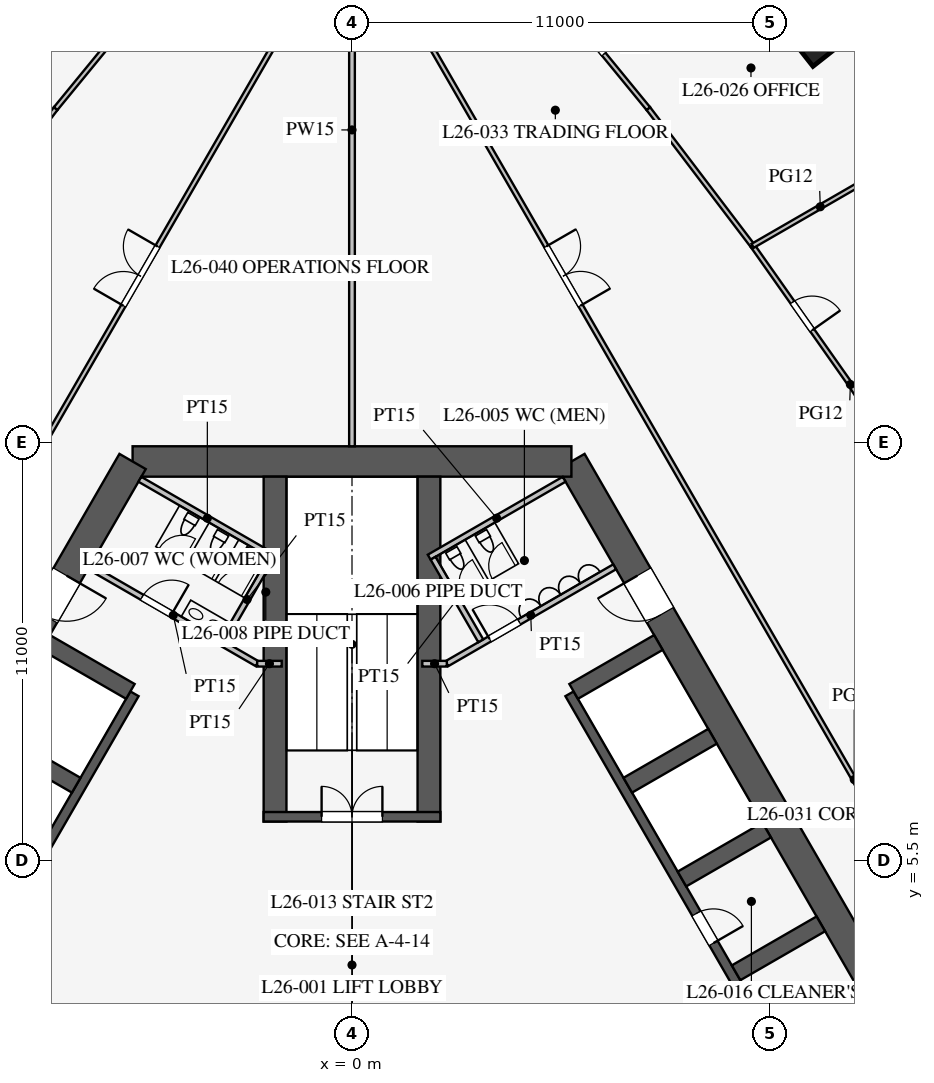
"""IFC4 building model, lengths in metres.
Left out: names, types, materials, properties, quantities, classifications, styles, units other than length and angle.
Written with IfcOpenShell. Run it as: python <this file> out.ifc"""

import sys

from ifc_helpers import new_model, si_unit, direction, frame, frame_2d, origin, origin_2d, place, context, subcontext, project, spatial, rectangle, extrude, element, fill, save


model = new_model("IFC4")
c1 = context("Model", 3, precision=1e-05, world=origin(), true_north=direction((0.0, 1.0)))
c2 = subcontext(c1, "Body", "Model", "MODEL_VIEW")
j1 = project(units=[si_unit("LENGTHUNIT", "METRE"), si_unit("PLANEANGLEUNIT", "RADIAN")], contexts=[c1])
p1 = place(None, origin())
s1 = spatial("IfcSite", under=j1, at=p1, CompositionType="ELEMENT")
p2 = place(p1, origin())
s2 = spatial("IfcBuilding", under=s1, at=p2, CompositionType="ELEMENT")
p3 = place(p2, frame((0.0, 0.0, 115.7)))
s3 = spatial("IfcBuildingStorey", under=s2, at=p3, CompositionType="ELEMENT", Elevation=115.7)
p4 = place(p3, frame((12.077, 27.757, 0.0), z_axis=(0.0, 0.0, 1.0), x_axis=(-0.619648882098, 0.78487913905, 0.0)))
e1 = element("IfcColumn", 1, at=p4, inside=s3, PredefinedType="COLUMN", context=c2, shape_type="SweptSolid", body=[
    extrude(rectangle(XDim=2.2, YDim=1.6, at=origin_2d()), origin(), (0.0, 0.0, 1.0), 4.2),
])
p5 = place(p3, frame((16.743, -3.0, 0.0), z_axis=(0.0, 0.0, 1.0), x_axis=(-0.500002442456, 0.866023993627, 0.0)))
e2 = element("IfcWall", 2, at=p5, inside=s3, PredefinedType="SHEAR", context=c2, shape_type="SweptSolid", body=[
    extrude(rectangle(XDim=21.939, YDim=0.8, at=frame_2d((10.97, 0.0))), origin(), (0.0, 0.0, 1.0), 4.2),
])
p6 = place(p5, frame((17.27, 0.0, 0.0)))
e3 = element("IfcOpeningElement", 3, at=p6, cuts=e2, PredefinedType="OPENING", context=c2, shape_type="SweptSolid", body=[
    extrude(rectangle(XDim=1.2, YDim=2.1, at=frame_2d((0.6, 1.05))), frame((0.0, 0.41, 0.0), z_axis=(0.0, -1.0, 0.0), x_axis=(1.0, 0.0, 0.0)), (0.0, 0.0, 1.0), 0.82),
])
p7 = place(p5, frame((3.47, 0.0, 0.0)))
e4 = element("IfcOpeningElement", 4, at=p7, cuts=e2, PredefinedType="OPENING", context=c2, shape_type="SweptSolid", body=[
    extrude(rectangle(XDim=1.2, YDim=2.1, at=frame_2d((0.6, 1.05))), frame((0.0, 0.41, 0.0), z_axis=(0.0, -1.0, 0.0), x_axis=(1.0, 0.0, 0.0)), (0.0, 0.0, 1.0), 0.82),
])
p8 = place(p3, frame((5.773, 16.0, 0.0), z_axis=(0.0, 0.0, 1.0), x_axis=(-1.0, 0.0, 0.0)))
e5 = element("IfcWall", 5, at=p8, inside=s3, PredefinedType="SHEAR", context=c2, shape_type="SweptSolid", body=[
    extrude(rectangle(XDim=11.547, YDim=0.8, at=frame_2d((5.773, 0.0))), origin(), (0.0, 0.0, 1.0), 4.2),
])
p9 = place(p3, frame((-5.773, 16.0, 0.0), z_axis=(0.0, 0.0, 1.0), x_axis=(-0.500002442456, -0.866023993627, 0.0)))
e6 = element("IfcWall", 6, at=p9, inside=s3, PredefinedType="SHEAR", context=c2, shape_type="SweptSolid", body=[
    extrude(rectangle(XDim=21.939, YDim=0.8, at=frame_2d((10.97, 0.0))), origin(), (0.0, 0.0, 1.0), 4.2),
])
p10 = place(p9, frame((17.27, 0.0, 0.0)))
e7 = element("IfcOpeningElement", 7, at=p10, cuts=e6, PredefinedType="OPENING", context=c2, shape_type="SweptSolid", body=[
    extrude(rectangle(XDim=1.2, YDim=2.1, at=frame_2d((0.6, 1.05))), frame((0.0, 0.41, 0.0), z_axis=(0.0, -1.0, 0.0), x_axis=(1.0, 0.0, 0.0)), (0.0, 0.0, 1.0), 0.82),
])
p11 = place(p9, frame((3.47, 0.0, 0.0)))
e8 = element("IfcOpeningElement", 8, at=p11, cuts=e6, PredefinedType="OPENING", context=c2, shape_type="SweptSolid", body=[
    extrude(rectangle(XDim=1.2, YDim=2.1, at=frame_2d((0.6, 1.05))), frame((0.0, 0.41, 0.0), z_axis=(0.0, -1.0, 0.0), x_axis=(1.0, 0.0, 0.0)), (0.0, 0.0, 1.0), 0.82),
])
p12 = place(p3, frame((11.424, 0.014, 0.0), z_axis=(0.0, 0.0, 1.0), x_axis=(-0.500001763848, 0.866024385424, 0.0)))
e9 = element("IfcWall", 9, at=p12, inside=s3, PredefinedType="SHEAR", context=c2, shape_type="SweptSolid", body=[
    extrude(rectangle(XDim=11.4, YDim=0.25, at=frame_2d((5.7, 0.0))), origin(), (0.0, 0.0, 1.0), 4.2),
])
p13 = place(p12, frame((0.975, 0.0, 0.0)))
e10 = element("IfcOpeningElement", 10, at=p13, cuts=e9, PredefinedType="OPENING", context=c2, shape_type="SweptSolid", body=[
    extrude(rectangle(XDim=0.9, YDim=2.1, at=frame_2d((0.45, 1.05))), frame((0.0, 0.135, 0.0), z_axis=(0.0, -1.0, 0.0), x_axis=(1.0, 0.0, 0.0)), (0.0, 0.0, 1.0), 0.27),
])
p14 = place(p12, frame((3.825, 0.0, 0.0)))
e11 = element("IfcOpeningElement", 11, at=p14, cuts=e9, PredefinedType="OPENING", context=c2, shape_type="SweptSolid", body=[
    extrude(rectangle(XDim=0.9, YDim=2.1, at=frame_2d((0.45, 1.05))), frame((0.0, 0.135, 0.0), z_axis=(0.0, -1.0, 0.0), x_axis=(1.0, 0.0, 0.0)), (0.0, 0.0, 1.0), 0.27),
])
for number, where, z_axis, x_axis in (
    (12, (10.107, 2.544, 0.0), (0.0, 0.0, 1.0), (0.866, 0.5, 0.0)),
    (13, (8.682, 5.012, 0.0), (0.0, 0.0, 1.0), (0.866, 0.5, 0.0)),
    (14, (7.257, 7.481, 0.0), (0.0, 0.0, 1.0), (0.866, 0.5, 0.0)),
):
    element("IfcWall", number, at=place(p3, frame(where, z_axis=z_axis, x_axis=x_axis)), inside=s3, PredefinedType="SHEAR", context=c2, shape_type="SweptSolid", body=[
        extrude(rectangle(XDim=2.575, YDim=0.45, at=frame_2d((1.288, 0.0))), origin(), (0.0, 0.0, 1.0), 4.2),
    ])
p15 = place(p3, frame((5.832, 9.949, 0.0), z_axis=(0.0, 0.0, 1.0), x_axis=(0.866029291668, 0.499993265928, 0.0)))
e15 = element("IfcWall", 15, at=p15, inside=s3, PredefinedType="SHEAR", context=c2, shape_type="SweptSolid", body=[
    extrude(rectangle(XDim=2.575, YDim=0.45, at=frame_2d((1.288, 0.0))), origin(), (0.0, 0.0, 1.0), 4.2),
])
p16 = place(p3, frame((-5.724, 9.886, 0.0), z_axis=(0.0, 0.0, 1.0), x_axis=(-0.500001763848, -0.866024385424, 0.0)))
e16 = element("IfcWall", 16, at=p16, inside=s3, PredefinedType="SHEAR", context=c2, shape_type="SweptSolid", body=[
    extrude(rectangle(XDim=11.4, YDim=0.25, at=frame_2d((5.7, 0.0))), origin(), (0.0, 0.0, 1.0), 4.2),
])
p17 = place(p16, frame((6.525, 0.0, 0.0)))
e17 = element("IfcOpeningElement", 17, at=p17, cuts=e16, PredefinedType="OPENING", context=c2, shape_type="SweptSolid", body=[
    extrude(rectangle(XDim=1.2, YDim=2.2, at=frame_2d((0.6, 1.1))), frame((0.0, 0.135, 0.0), z_axis=(0.0, -1.0, 0.0), x_axis=(1.0, 0.0, 0.0)), (0.0, 0.0, 1.0), 0.27),
])
p18 = place(p16, frame((9.375, 0.0, 0.0)))
e18 = element("IfcOpeningElement", 18, at=p18, cuts=e16, PredefinedType="OPENING", context=c2, shape_type="SweptSolid", body=[
    extrude(rectangle(XDim=1.2, YDim=2.2, at=frame_2d((0.6, 1.1))), frame((0.0, 0.135, 0.0), z_axis=(0.0, -1.0, 0.0), x_axis=(1.0, 0.0, 0.0)), (0.0, 0.0, 1.0), 0.27),
])
p19 = place(p3, frame((-5.832, 9.949, 0.0), z_axis=(0.0, 0.0, 1.0), x_axis=(-0.866029291668, 0.499993265928, 0.0)))
e19 = element("IfcWall", 19, at=p19, inside=s3, PredefinedType="SHEAR", context=c2, shape_type="SweptSolid", body=[
    extrude(rectangle(XDim=2.575, YDim=0.45, at=frame_2d((1.288, 0.0))), origin(), (0.0, 0.0, 1.0), 4.2),
])
p20 = place(p3, frame((-7.257, 7.481, 0.0), z_axis=(0.0, 0.0, 1.0), x_axis=(-0.866046643894, 0.499963209246, 0.0)))
e20 = element("IfcWall", 20, at=p20, inside=s3, PredefinedType="SHEAR", context=c2, shape_type="SweptSolid", body=[
    extrude(rectangle(XDim=2.575, YDim=0.45, at=frame_2d((1.288, 0.0))), origin(), (0.0, 0.0, 1.0), 4.2),
])
for number, where, z_axis, x_axis in (
    (21, (2.025, 6.525, 0.0), (0.0, 0.0, 1.0), (0.0, 1.0, 0.0)),
    (22, (-2.025, 6.525, 0.0), (0.0, 0.0, 1.0), (0.0, 1.0, 0.0)),
):
    element("IfcWall", number, at=place(p3, frame(where, z_axis=z_axis, x_axis=x_axis)), inside=s3, PredefinedType="SHEAR", context=c2, shape_type="SweptSolid", body=[
        extrude(rectangle(XDim=9.075, YDim=0.6, at=frame_2d((4.538, 0.0))), origin(), (0.0, 0.0, 1.0), 4.2),
    ])
p21 = place(p3, frame((2.325, 6.65, 0.0), z_axis=(0.0, 0.0, 1.0), x_axis=(-1.0, 0.0, 0.0)))
e23 = element("IfcWall", 23, at=p21, inside=s3, PredefinedType="SHEAR", context=c2, shape_type="SweptSolid", body=[
    extrude(rectangle(XDim=4.65, YDim=0.25, at=frame_2d((2.325, 0.0))), origin(), (0.0, 0.0, 1.0), 4.2),
])
p22 = place(p21, frame((1.525, 0.0, 0.0)))
e24 = element("IfcOpeningElement", 24, at=p22, cuts=e23, PredefinedType="OPENING", context=c2, shape_type="SweptSolid", body=[
    extrude(rectangle(XDim=1.6, YDim=2.1, at=frame_2d((0.8, 1.05))), frame((0.0, 0.135, 0.0), z_axis=(0.0, -1.0, 0.0), x_axis=(1.0, 0.0, 0.0)), (0.0, 0.0, 1.0), 0.27),
])
p23 = place(p3, frame((2.495, 10.678, 0.0), z_axis=(0.0, 0.0, 1.0), x_axis=(0.86602216432, 0.500005610874, 0.0)))
e25 = element("IfcWall", 25, at=p23, inside=s3, PredefinedType="PARTITIONING", context=c2, shape_type="SweptSolid", body=[
    extrude(rectangle(XDim=5.1, YDim=0.15, at=frame_2d((2.55, 0.0))), origin(), (0.0, 0.0, 1.0), 4.0),
])
p24 = place(p23, frame((1.3, 0.0, 0.0)))
e26 = element("IfcOpeningElement", 26, at=p24, cuts=e25, PredefinedType="OPENING", context=c2, shape_type="SweptSolid", body=[
    extrude(rectangle(XDim=0.9, YDim=2.1, at=frame_2d((0.45, 1.05))), frame((0.0, 0.085, 0.0), z_axis=(0.0, -1.0, 0.0), x_axis=(1.0, 0.0, 0.0)), (0.0, 0.0, 1.0), 0.17),
])
p25 = place(p3, frame((-2.495, 10.678, 0.0), z_axis=(0.0, 0.0, 1.0), x_axis=(-0.86602216432, 0.500005610874, 0.0)))
e27 = element("IfcWall", 27, at=p25, inside=s3, PredefinedType="PARTITIONING", context=c2, shape_type="SweptSolid", body=[
    extrude(rectangle(XDim=5.1, YDim=0.15, at=frame_2d((2.55, 0.0))), origin(), (0.0, 0.0, 1.0), 4.0),
])
p26 = place(p25, frame((2.6, 0.0, 0.0)))
e28 = element("IfcOpeningElement", 28, at=p26, cuts=e27, PredefinedType="OPENING", context=c2, shape_type="SweptSolid", body=[
    extrude(rectangle(XDim=0.9, YDim=2.1, at=frame_2d((0.45, 1.05))), frame((0.0, 0.085, 0.0), z_axis=(0.0, -1.0, 0.0), x_axis=(1.0, 0.0, 0.0)), (0.0, 0.0, 1.0), 0.17),
])
for number, where, z_axis, x_axis in (
    (29, (2.495, 10.678, 0.0), (0.0, 0.0, 1.0), (-1.0, 0.0, 0.0)),
    (30, (-2.495, 10.678, 0.0), (0.0, 0.0, 1.0), (1.0, 0.0, 0.0)),
):
    element("IfcWall", number, at=place(p3, frame(where, z_axis=z_axis, x_axis=x_axis)), inside=s3, PredefinedType="PARTITIONING", context=c2, shape_type="SweptSolid", body=[
        extrude(rectangle(XDim=0.645, YDim=0.15, at=frame_2d((0.323, 0.0))), origin(), (0.0, 0.0, 1.0), 4.0),
    ])
p27 = place(p3, frame((2.031, 13.482, 0.0), z_axis=(0.0, 0.0, 1.0), x_axis=(0.866050731258, 0.499956128963, 0.0)))
e31 = element("IfcWall", 31, at=p27, inside=s3, PredefinedType="PARTITIONING", context=c2, shape_type="SweptSolid", body=[
    extrude(rectangle(XDim=4.1, YDim=0.15, at=frame_2d((2.05, 0.0))), origin(), (0.0, 0.0, 1.0), 4.0),
])
p28 = place(p3, frame((3.389, 11.281, 0.0), z_axis=(0.0, 0.0, 1.0), x_axis=(-0.499989096993, 0.866031698547, 0.0)))
e32 = element("IfcWall", 32, at=p28, inside=s3, PredefinedType="PARTITIONING", context=c2, shape_type="SweptSolid", body=[
    extrude(rectangle(XDim=2.51, YDim=0.15, at=frame_2d((1.255, 0.0))), origin(), (0.0, 0.0, 1.0), 4.0),
])
p29 = place(p3, frame((-2.031, 13.482, 0.0), z_axis=(0.0, 0.0, 1.0), x_axis=(-0.866050731258, 0.499956128963, 0.0)))
e33 = element("IfcWall", 33, at=p29, inside=s3, PredefinedType="PARTITIONING", context=c2, shape_type="SweptSolid", body=[
    extrude(rectangle(XDim=4.1, YDim=0.15, at=frame_2d((2.05, 0.0))), origin(), (0.0, 0.0, 1.0), 4.0),
])
p30 = place(p3, frame((-3.389, 11.281, 0.0), z_axis=(0.0, 0.0, 1.0), x_axis=(0.499989096993, 0.866031698547, 0.0)))
e34 = element("IfcWall", 34, at=p30, inside=s3, PredefinedType="PARTITIONING", context=c2, shape_type="SweptSolid", body=[
    extrude(rectangle(XDim=2.51, YDim=0.15, at=frame_2d((1.255, 0.0))), origin(), (0.0, 0.0, 1.0), 4.0),
])
p31 = place(p3, frame((0.0, 16.4, 0.0), z_axis=(0.0, 0.0, 1.0), x_axis=(0.0, 1.0, 0.0)))
e35 = element("IfcWall", 35, at=p31, inside=s3, PredefinedType="PARTITIONING", context=c2, shape_type="SweptSolid", body=[
    extrude(rectangle(XDim=16.65, YDim=0.15, at=frame_2d((8.325, 0.0))), origin(), (0.0, 0.0, 1.0), 2.3),
])
p32 = place(p3, frame((26.415, -15.231, 0.0), z_axis=(0.0, 0.0, 1.0), x_axis=(-0.50000091641, 0.866024874695, 0.0)))
e36 = element("IfcWall", 36, at=p32, inside=s3, PredefinedType="PARTITIONING", context=c2, shape_type="SweptSolid", body=[
    extrude(rectangle(XDim=52.796, YDim=0.12, at=frame_2d((26.398, 0.0))), origin(), (0.0, 0.0, 1.0), 2.9),
])
p33 = place(p32, frame((10.2, 0.0, 0.15)))
e37 = element("IfcOpeningElement", 37, at=p33, cuts=e36, PredefinedType="OPENING", context=c2, shape_type="SweptSolid", body=[
    extrude(rectangle(XDim=1.8, YDim=2.1, at=frame_2d((0.9, 1.05))), frame((0.0, 0.07, 0.0), z_axis=(0.0, -1.0, 0.0), x_axis=(1.0, 0.0, 0.0)), (0.0, 0.0, 1.0), 0.14),
])
p34 = place(p32, frame((40.8, 0.0, 0.15)))
e38 = element("IfcOpeningElement", 38, at=p34, cuts=e36, PredefinedType="OPENING", context=c2, shape_type="SweptSolid", body=[
    extrude(rectangle(XDim=1.8, YDim=2.1, at=frame_2d((0.9, 1.05))), frame((0.0, 0.07, 0.0), z_axis=(0.0, -1.0, 0.0), x_axis=(1.0, 0.0, 0.0)), (0.0, 0.0, 1.0), 0.14),
])
p35 = place(p3, frame((10.543, 21.675, 0.0), z_axis=(0.0, 0.0, 1.0), x_axis=(-0.605274299339, 0.796016973789, 0.0)))
e39 = element("IfcWall", 39, at=p35, inside=s3, PredefinedType="PARTITIONING", context=c2, shape_type="SweptSolid", body=[
    extrude(rectangle(XDim=4.536, YDim=0.12, at=frame_2d((2.268, 0.0))), origin(), (0.0, 0.0, 1.0), 2.9),
])
p36 = place(p3, frame((7.797, 25.286, 0.0), z_axis=(0.0, 0.0, 1.0), x_axis=(-0.633843962561, 0.773460943503, 0.0)))
e40 = element("IfcWall", 40, at=p36, inside=s3, PredefinedType="PARTITIONING", context=c2, shape_type="SweptSolid", body=[
    extrude(rectangle(XDim=4.561, YDim=0.12, at=frame_2d((2.28, 0.0))), origin(), (0.0, 0.0, 1.0), 2.9),
])
p37 = place(p36, frame((1.85, 0.0, 0.15)))
e41 = element("IfcOpeningElement", 41, at=p37, cuts=e40, PredefinedType="OPENING", context=c2, shape_type="SweptSolid", body=[
    extrude(rectangle(XDim=0.9, YDim=2.1, at=frame_2d((0.45, 1.05))), frame((0.0, 0.07, 0.0), z_axis=(0.0, -1.0, 0.0), x_axis=(1.0, 0.0, 0.0)), (0.0, 0.0, 1.0), 0.14),
])
p38 = place(p3, frame((15.606, 14.206, 0.0), z_axis=(0.0, 0.0, 1.0), x_axis=(-0.546069464151, 0.837739900161, 0.0)))
e42 = element("IfcWall", 42, at=p38, inside=s3, PredefinedType="PARTITIONING", context=c2, shape_type="SweptSolid", body=[
    extrude(rectangle(XDim=4.507, YDim=0.12, at=frame_2d((2.253, 0.0))), origin(), (0.0, 0.0, 1.0), 2.9),
])
p39 = place(p3, frame((13.145, 17.982, 0.0), z_axis=(0.0, 0.0, 1.0), x_axis=(-0.575987178736, 0.817458726745, 0.0)))
e43 = element("IfcWall", 43, at=p39, inside=s3, PredefinedType="PARTITIONING", context=c2, shape_type="SweptSolid", body=[
    extrude(rectangle(XDim=4.518, YDim=0.12, at=frame_2d((2.259, 0.0))), origin(), (0.0, 0.0, 1.0), 2.9),
])
p40 = place(p39, frame((1.8, 0.0, 0.15)))
e44 = element("IfcOpeningElement", 44, at=p40, cuts=e43, PredefinedType="OPENING", context=c2, shape_type="SweptSolid", body=[
    extrude(rectangle(XDim=0.9, YDim=2.1, at=frame_2d((0.45, 1.05))), frame((0.0, 0.07, 0.0), z_axis=(0.0, -1.0, 0.0), x_axis=(1.0, 0.0, 0.0)), (0.0, 0.0, 1.0), 0.14),
])
p41 = place(p3, frame((10.543, 21.675, 0.0), z_axis=(0.0, 0.0, 1.0), x_axis=(0.866019409031, 0.500010383074, 0.0)))
e45 = element("IfcWall", 45, at=p41, inside=s3, PredefinedType="PARTITIONING", context=c2, shape_type="SweptSolid", body=[
    extrude(rectangle(XDim=4.11, YDim=0.12, at=frame_2d((2.055, 0.0))), origin(), (0.0, 0.0, 1.0), 2.9),
])
p42 = place(p3, frame((-0.016, 30.491, 0.0), z_axis=(0.0, 0.0, 1.0), x_axis=(-0.50000091641, -0.866024874695, 0.0)))
e46 = element("IfcWall", 46, at=p42, inside=s3, PredefinedType="PARTITIONING", context=c2, shape_type="SweptSolid", body=[
    extrude(rectangle(XDim=52.796, YDim=0.12, at=frame_2d((26.398, 0.0))), origin(), (0.0, 0.0, 1.0), 2.9),
])
p43 = place(p42, frame((10.2, 0.0, 0.15)))
e47 = element("IfcOpeningElement", 47, at=p43, cuts=e46, PredefinedType="OPENING", context=c2, shape_type="SweptSolid", body=[
    extrude(rectangle(XDim=1.8, YDim=2.1, at=frame_2d((0.9, 1.05))), frame((0.0, 0.07, 0.0), z_axis=(0.0, -1.0, 0.0), x_axis=(1.0, 0.0, 0.0)), (0.0, 0.0, 1.0), 0.14),
])
p44 = place(p42, frame((40.8, 0.0, 0.15)))
e48 = element("IfcOpeningElement", 48, at=p44, cuts=e46, PredefinedType="OPENING", context=c2, shape_type="SweptSolid", body=[
    extrude(rectangle(XDim=1.8, YDim=2.1, at=frame_2d((0.9, 1.05))), frame((0.0, 0.07, 0.0), z_axis=(0.0, -1.0, 0.0), x_axis=(1.0, 0.0, 0.0)), (0.0, 0.0, 1.0), 0.14),
])
p45 = place(p3, frame((-7.797, 25.286, 0.0), z_axis=(0.0, 0.0, 1.0), x_axis=(-0.605274299339, -0.796016973789, 0.0)))
e49 = element("IfcWall", 49, at=p45, inside=s3, PredefinedType="PARTITIONING", context=c2, shape_type="SweptSolid", body=[
    extrude(rectangle(XDim=4.536, YDim=0.12, at=frame_2d((2.268, 0.0))), origin(), (0.0, 0.0, 1.0), 2.9),
])
p46 = place(p45, frame((1.8, 0.0, 0.15)))
e50 = element("IfcOpeningElement", 50, at=p46, cuts=e49, PredefinedType="OPENING", context=c2, shape_type="SweptSolid", body=[
    extrude(rectangle(XDim=0.9, YDim=2.1, at=frame_2d((0.45, 1.05))), frame((0.0, 0.07, 0.0), z_axis=(0.0, -1.0, 0.0), x_axis=(1.0, 0.0, 0.0)), (0.0, 0.0, 1.0), 0.14),
])
p47 = place(p3, frame((-4.906, 28.813, 0.0), z_axis=(0.0, 0.0, 1.0), x_axis=(-0.633843962561, -0.773460943503, 0.0)))
e51 = element("IfcWall", 51, at=p47, inside=s3, PredefinedType="PARTITIONING", context=c2, shape_type="SweptSolid", body=[
    extrude(rectangle(XDim=4.561, YDim=0.12, at=frame_2d((2.28, 0.0))), origin(), (0.0, 0.0, 1.0), 2.9),
])
p48 = place(p24, origin())
e52 = element("IfcDoor", 52, at=p48, inside=s3, OperationType="SINGLE_SWING_LEFT", PredefinedType="DOOR", context=c2, shape_type="SweptSolid", body=[
    extrude(rectangle(XDim=0.9, YDim=2.1, at=frame_2d((0.45, 1.05))), frame((0.0, 0.025, 0.0), z_axis=(0.0, -1.0, 0.0), x_axis=(1.0, 0.0, 0.0)), (0.0, 0.0, 1.0), 0.05),
])
fill(e26, e52)
p49 = place(p26, frame((0.9, 0.0, 0.0), z_axis=(0.0, 0.0, 1.0), x_axis=(-1.0, 0.0, 0.0)))
e53 = element("IfcDoor", 53, at=p49, inside=s3, OperationType="SINGLE_SWING_RIGHT", PredefinedType="DOOR", context=c2, shape_type="SweptSolid", body=[
    extrude(rectangle(XDim=0.9, YDim=2.1, at=frame_2d((0.45, 1.05))), frame((0.0, 0.025, 0.0), z_axis=(0.0, -1.0, 0.0), x_axis=(1.0, 0.0, 0.0)), (0.0, 0.0, 1.0), 0.05),
])
fill(e28, e53)
p50 = place(p22, frame((1.6, 0.0, 0.0), z_axis=(0.0, 0.0, 1.0), x_axis=(-1.0, 0.0, 0.0)))
e54 = element("IfcDoor", 54, at=p50, inside=s3, OperationType="DOUBLE_DOOR_SINGLE_SWING", PredefinedType="DOOR", context=c2, shape_type="SweptSolid", body=[
    extrude(rectangle(XDim=1.6, YDim=2.1, at=frame_2d((0.8, 1.05))), frame((0.0, 0.025, 0.0), z_axis=(0.0, -1.0, 0.0), x_axis=(1.0, 0.0, 0.0)), (0.0, 0.0, 1.0), 0.05),
])
fill(e24, e54)
p51 = place(p6, origin())
e55 = element("IfcDoor", 55, at=p51, inside=s3, OperationType="SINGLE_SWING_RIGHT", PredefinedType="DOOR", context=c2, shape_type="SweptSolid", body=[
    extrude(rectangle(XDim=1.2, YDim=2.1, at=frame_2d((0.6, 1.05))), frame((0.0, 0.025, 0.0), z_axis=(0.0, -1.0, 0.0), x_axis=(1.0, 0.0, 0.0)), (0.0, 0.0, 1.0), 0.05),
])
fill(e3, e55)
p52 = place(p11, origin())
e56 = element("IfcDoor", 56, at=p52, inside=s3, OperationType="SINGLE_SWING_LEFT", PredefinedType="DOOR", context=c2, shape_type="SweptSolid", body=[
    extrude(rectangle(XDim=1.2, YDim=2.1, at=frame_2d((0.6, 1.05))), frame((0.0, 0.025, 0.0), z_axis=(0.0, -1.0, 0.0), x_axis=(1.0, 0.0, 0.0)), (0.0, 0.0, 1.0), 0.05),
])
fill(e8, e56)
p53 = place(p14, frame((0.9, 0.0, 0.0), z_axis=(0.0, 0.0, 1.0), x_axis=(-1.0, 0.0, 0.0)))
e57 = element("IfcDoor", 57, at=p53, inside=s3, OperationType="SINGLE_SWING_RIGHT", PredefinedType="DOOR", context=c2, shape_type="SweptSolid", body=[
    extrude(rectangle(XDim=0.9, YDim=2.1, at=frame_2d((0.45, 1.05))), frame((0.0, 0.025, 0.0), z_axis=(0.0, -1.0, 0.0), x_axis=(1.0, 0.0, 0.0)), (0.0, 0.0, 1.0), 0.05),
])
fill(e11, e57)
p54 = place(p37, frame((0.9, 0.0, 0.0), z_axis=(0.0, 0.0, 1.0), x_axis=(-1.0, 0.0, 0.0)))
e58 = element("IfcDoor", 58, at=p54, inside=s3, OperationType="SINGLE_SWING_LEFT", PredefinedType="DOOR", context=c2, shape_type="SweptSolid", body=[
    extrude(rectangle(XDim=0.9, YDim=2.1, at=frame_2d((0.45, 1.05))), frame((0.0, 0.025, 0.0), z_axis=(0.0, -1.0, 0.0), x_axis=(1.0, 0.0, 0.0)), (0.0, 0.0, 1.0), 0.05),
])
fill(e41, e58)
p55 = place(p40, frame((0.9, 0.0, 0.0), z_axis=(0.0, 0.0, 1.0), x_axis=(-1.0, 0.0, 0.0)))
e59 = element("IfcDoor", 59, at=p55, inside=s3, OperationType="SINGLE_SWING_RIGHT", PredefinedType="DOOR", context=c2, shape_type="SweptSolid", body=[
    extrude(rectangle(XDim=0.9, YDim=2.1, at=frame_2d((0.45, 1.05))), frame((0.0, 0.025, 0.0), z_axis=(0.0, -1.0, 0.0), x_axis=(1.0, 0.0, 0.0)), (0.0, 0.0, 1.0), 0.05),
])
fill(e44, e59)
p56 = place(p34, frame((1.8, 0.0, 0.0), z_axis=(0.0, 0.0, 1.0), x_axis=(-1.0, 0.0, 0.0)))
e60 = element("IfcDoor", 60, at=p56, inside=s3, OperationType="DOUBLE_DOOR_SINGLE_SWING", PredefinedType="DOOR", context=c2, shape_type="SweptSolid", body=[
    extrude(rectangle(XDim=1.8, YDim=2.1, at=frame_2d((0.9, 1.05))), frame((0.0, 0.025, 0.0), z_axis=(0.0, -1.0, 0.0), x_axis=(1.0, 0.0, 0.0)), (0.0, 0.0, 1.0), 0.05),
])
fill(e38, e60)
p57 = place(p43, frame((1.8, 0.0, 0.0), z_axis=(0.0, 0.0, 1.0), x_axis=(-1.0, 0.0, 0.0)))
e61 = element("IfcDoor", 61, at=p57, inside=s3, OperationType="DOUBLE_DOOR_SINGLE_SWING", PredefinedType="DOOR", context=c2, shape_type="SweptSolid", body=[
    extrude(rectangle(XDim=1.8, YDim=2.1, at=frame_2d((0.9, 1.05))), frame((0.0, 0.025, 0.0), z_axis=(0.0, -1.0, 0.0), x_axis=(1.0, 0.0, 0.0)), (0.0, 0.0, 1.0), 0.05),
])
fill(e47, e61)
save(model, sys.argv[1])
